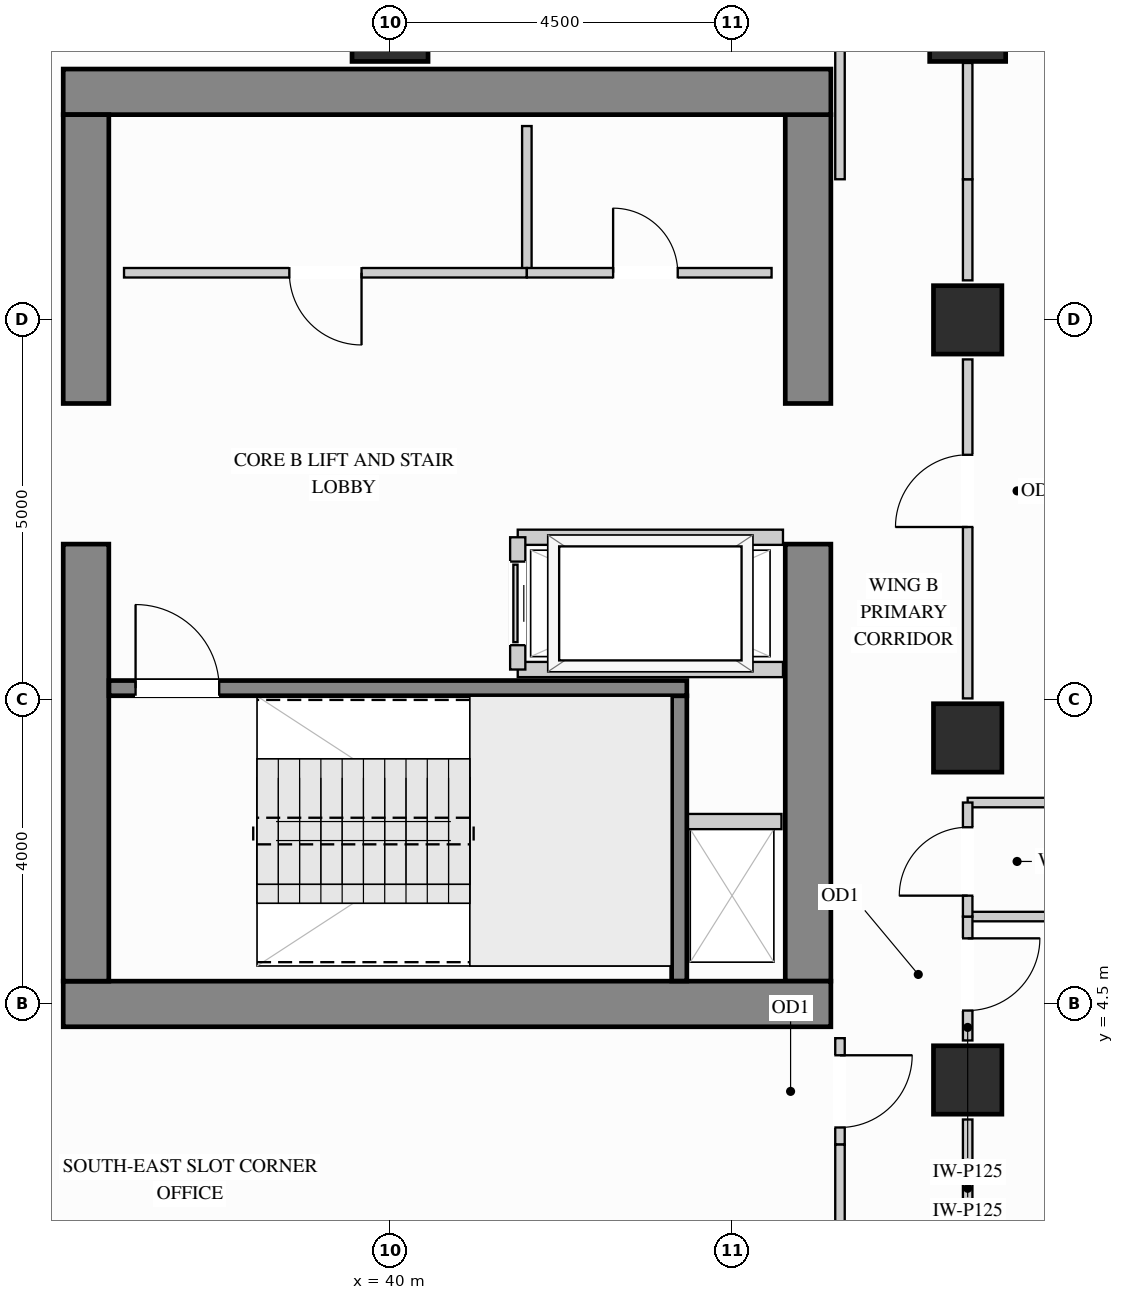
"""IFC4 building model, lengths in metres.
Left out: names, types, materials, properties, quantities, classifications, styles, units other than length and angle.
Written with IfcOpenShell. Run it as: python <this file> out.ifc"""

import sys

from ifc_helpers import new_model, si_unit, direction, frame, frame_2d, origin, origin_2d, place, context, subcontext, project, spatial, rectangle, extrude, source, transform, mapped, element, fill, save


model = new_model("IFC4")
c1 = context("Model", 3, precision=1e-05, world=origin(), true_north=direction((0.0, 1.0)))
c2 = subcontext(c1, "Body", "Model", "MODEL_VIEW")
j1 = project(units=[si_unit("LENGTHUNIT", "METRE"), si_unit("PLANEANGLEUNIT", "RADIAN")], contexts=[c1])
p1 = place(None, origin())
s1 = spatial("IfcSite", under=j1, at=p1, CompositionType="ELEMENT")
p2 = place(p1, origin())
s2 = spatial("IfcBuilding", under=s1, at=p2, CompositionType="ELEMENT")
p3 = place(p2, frame((0.0, 0.0, 175.5)))
s3 = spatial("IfcBuildingStorey", under=s2, at=p3, CompositionType="ELEMENT", Elevation=175.5)
m1 = source(origin(), c2, "Body", "SweptSolid", [
    extrude(rectangle(XDim=0.9, YDim=0.9, at=origin_2d()), origin(), (0.0, 0.0, 1.0), 3.4),
])
for number, where, z_axis, x_axis in (
    (1, (47.6, 13.5, 0.0), (0.0, 0.0, 1.0), (1.0, 0.0, 0.0)),
    (2, (47.6, 3.5, 0.0), (0.0, 0.0, 1.0), (1.0, 0.0, 0.0)),
    (3, (47.6, 8.0, 0.0), (0.0, 0.0, 1.0), (1.0, 0.0, 0.0)),
):
    element("IfcColumn", number, at=place(p3, frame(where, z_axis=z_axis, x_axis=x_axis)), inside=s3, PredefinedType="COLUMN", context=c2, shape_type="MappedRepresentation", body=[
        mapped(m1, transform((0.0, 0.0, 0.0), x_axis=(1.0, 0.0, 0.0), y_axis=(0.0, 1.0, 0.0), z_axis=(0.0, 0.0, 1.0))),
    ])
m2 = source(origin(), c2, "Body", "SweptSolid", [
    extrude(rectangle(XDim=1.0, YDim=1.0, at=origin_2d()), origin(), (0.0, 0.0, 1.0), 3.4),
])
for number, where, z_axis, x_axis in (
    (4, (40.0, 17.4, 0.0), (0.0, 0.0, 1.0), (1.0, 0.0, 0.0)),
    (5, (47.6, 17.4, 0.0), (0.0, 0.0, 1.0), (1.0, 0.0, 0.0)),
):
    element("IfcColumn", number, at=place(p3, frame(where, z_axis=z_axis, x_axis=x_axis)), inside=s3, PredefinedType="COLUMN", context=c2, shape_type="MappedRepresentation", body=[
        mapped(m2, transform((0.0, 0.0, 0.0), x_axis=(1.0, 0.0, 0.0), y_axis=(0.0, 1.0, 0.0), z_axis=(0.0, 0.0, 1.0))),
    ])
m3 = source(origin(), c2, "Body", "SweptSolid", [
    extrude(rectangle(XDim=5.75, YDim=0.6, at=frame_2d((2.875, 0.0))), origin(), (0.0, 0.0, 1.0), 3.4),
])
p4 = place(p3, frame((45.5, 4.8, 0.0), z_axis=(0.0, 0.0, 1.0), x_axis=(0.0, 1.0, 0.0)))
e6 = element("IfcWall", 6, at=p4, inside=s3, PredefinedType="SHEAR", context=c2, shape_type="MappedRepresentation", body=[
    mapped(m3, transform((0.0, 0.0, 0.0), x_axis=(1.0, 0.0, 0.0), y_axis=(0.0, 1.0, 0.0), z_axis=(0.0, 0.0, 1.0))),
])
m4 = source(origin(), c2, "Body", "SweptSolid", [
    extrude(rectangle(XDim=3.8, YDim=0.6, at=frame_2d((1.9, 0.0))), origin(), (0.0, 0.0, 1.0), 3.4),
])
p5 = place(p3, frame((45.5, 12.4, 0.0), z_axis=(0.0, 0.0, 1.0), x_axis=(0.0, 1.0, 0.0)))
e7 = element("IfcWall", 7, at=p5, inside=s3, PredefinedType="SHEAR", context=c2, shape_type="MappedRepresentation", body=[
    mapped(m4, transform((0.0, 0.0, 0.0), x_axis=(1.0, 0.0, 0.0), y_axis=(0.0, 1.0, 0.0), z_axis=(0.0, 0.0, 1.0))),
])
m5 = source(origin(), c2, "Body", "SweptSolid", [
    extrude(rectangle(XDim=10.1, YDim=0.6, at=frame_2d((5.05, 0.0))), origin(), (0.0, 0.0, 1.0), 3.4),
])
for number, where, z_axis, x_axis in (
    (8, (35.7, 16.5, 0.0), (0.0, 0.0, 1.0), (1.0, 0.0, 0.0)),
    (9, (35.7, 4.5, 0.0), (0.0, 0.0, 1.0), (1.0, 0.0, 0.0)),
):
    element("IfcWall", number, at=place(p3, frame(where, z_axis=z_axis, x_axis=x_axis)), inside=s3, PredefinedType="SHEAR", context=c2, shape_type="MappedRepresentation", body=[
        mapped(m5, transform((0.0, 0.0, 0.0), x_axis=(1.0, 0.0, 0.0), y_axis=(0.0, 1.0, 0.0), z_axis=(0.0, 0.0, 1.0))),
    ])
p6 = place(p3, frame((36.0, 4.8, 0.0), z_axis=(0.0, 0.0, 1.0), x_axis=(0.0, 1.0, 0.0)))
e10 = element("IfcWall", 10, at=p6, inside=s3, PredefinedType="SHEAR", context=c2, shape_type="MappedRepresentation", body=[
    mapped(m3, transform((0.0, 0.0, 0.0), x_axis=(1.0, 0.0, 0.0), y_axis=(0.0, 1.0, 0.0), z_axis=(0.0, 0.0, 1.0))),
])
p7 = place(p3, frame((36.0, 12.4, 0.0), z_axis=(0.0, 0.0, 1.0), x_axis=(0.0, 1.0, 0.0)))
e11 = element("IfcWall", 11, at=p7, inside=s3, PredefinedType="SHEAR", context=c2, shape_type="MappedRepresentation", body=[
    mapped(m4, transform((0.0, 0.0, 0.0), x_axis=(1.0, 0.0, 0.0), y_axis=(0.0, 1.0, 0.0), z_axis=(0.0, 0.0, 1.0))),
])
m6 = source(origin(), c2, "Body", "SweptSolid", [
    extrude(rectangle(XDim=1.93, YDim=0.125, at=frame_2d((0.965, 0.0))), origin(), (0.0, 0.0, 1.0), 3.385),
])
p8 = place(p3, frame((41.8, 14.12, 0.0), z_axis=(0.0, 0.0, 1.0), x_axis=(0.0, 1.0, 0.0)))
e12 = element("IfcWall", 12, at=p8, inside=s3, PredefinedType="PARTITIONING", context=c2, shape_type="MappedRepresentation", body=[
    mapped(m6, transform((0.0, 0.0, 0.0), x_axis=(1.0, 0.0, 0.0), y_axis=(0.0, 1.0, 0.0), z_axis=(0.0, 0.0, 1.0))),
])
p9 = place(p3, frame((36.5, 14.12, 0.0), z_axis=(0.0, 0.0, 1.0), x_axis=(1.0, 0.0, 0.0)))
e13 = element("IfcWall", 13, at=p9, inside=s3, PredefinedType="PARTITIONING", context=c2, shape_type="SweptSolid", body=[
    extrude(rectangle(XDim=5.3, YDim=0.125, at=frame_2d((2.65, 0.0))), origin(), (0.0, 0.0, 1.0), 3.385),
])
p10 = place(p9, frame((2.175, 0.0, 0.0)))
e14 = element("IfcOpeningElement", 14, at=p10, cuts=e13, PredefinedType="OPENING", context=c2, shape_type="SweptSolid", body=[
    extrude(rectangle(XDim=0.95, YDim=2.15, at=frame_2d((0.475, 1.075))), frame((0.0, 0.073, 0.0), z_axis=(0.0, -1.0, 0.0), x_axis=(1.0, 0.0, 0.0)), (0.0, 0.0, 1.0), 0.145),
])
p11 = place(p3, frame((41.8, 14.12, 0.0), z_axis=(0.0, 0.0, 1.0), x_axis=(1.0, 0.0, 0.0)))
e15 = element("IfcWall", 15, at=p11, inside=s3, PredefinedType="PARTITIONING", context=c2, shape_type="SweptSolid", body=[
    extrude(rectangle(XDim=3.22, YDim=0.125, at=frame_2d((1.61, 0.0))), origin(), (0.0, 0.0, 1.0), 3.385),
])
p12 = place(p11, frame((1.135, 0.0, 0.0)))
e16 = element("IfcOpeningElement", 16, at=p12, cuts=e15, PredefinedType="OPENING", context=c2, shape_type="SweptSolid", body=[
    extrude(rectangle(XDim=0.85, YDim=2.1, at=frame_2d((0.425, 1.05))), frame((0.0, 0.073, 0.0), z_axis=(0.0, -1.0, 0.0), x_axis=(1.0, 0.0, 0.0)), (0.0, 0.0, 1.0), 0.145),
])
m7 = source(origin(), c2, "Body", "SweptSolid", [
    extrude(rectangle(XDim=5.048, YDim=0.125, at=frame_2d((2.524, 0.0))), origin(), (0.0, 0.0, 1.0), 3.385),
])
for number, where, z_axis, x_axis in (
    (17, (47.6, 5.65, 0.0), (0.0, 0.0, 1.0), (1.0, 0.0, 0.0)),
    (18, (47.6, 7.15, 0.0), (0.0, 0.0, 1.0), (1.0, 0.0, 0.0)),
):
    element("IfcWall", number, at=place(p3, frame(where, z_axis=z_axis, x_axis=x_axis)), inside=s3, PredefinedType="PARTITIONING", context=c2, shape_type="MappedRepresentation", body=[
        mapped(m7, transform((0.0, 0.0, 0.0), x_axis=(1.0, 0.0, 0.0), y_axis=(0.0, 1.0, 0.0), z_axis=(0.0, 0.0, 1.0))),
    ])
p13 = place(p3, frame((47.6, 4.02, 0.0), z_axis=(0.0, 0.0, 1.0), x_axis=(0.0, 1.0, 0.0)))
e19 = element("IfcWall", 19, at=p13, inside=s3, PredefinedType="PARTITIONING", context=c2, shape_type="SweptSolid", body=[
    extrude(rectangle(XDim=1.63, YDim=0.125, at=frame_2d((0.815, 0.0))), origin(), (0.0, 0.0, 1.0), 2.773),
])
p14 = place(p13, frame((0.393, 0.0, 0.0)))
e20 = element("IfcOpeningElement", 20, at=p14, cuts=e19, PredefinedType="OPENING", context=c2, shape_type="SweptSolid", body=[
    extrude(rectangle(XDim=0.95, YDim=2.15, at=frame_2d((0.475, 1.075))), frame((0.0, 0.073, 0.0), z_axis=(0.0, -1.0, 0.0), x_axis=(1.0, 0.0, 0.0)), (0.0, 0.0, 1.0), 0.145),
])
m8 = source(origin(), c2, "Body", "SweptSolid", [
    extrude(rectangle(XDim=1.86, YDim=0.125, at=frame_2d((0.93, 0.0))), origin(), (0.0, 0.0, 1.0), 2.773),
])
p15 = place(p3, frame((47.6, 1.12, 0.0), z_axis=(0.0, 0.0, 1.0), x_axis=(0.0, 1.0, 0.0)))
e21 = element("IfcWall", 21, at=p15, inside=s3, PredefinedType="PARTITIONING", context=c2, shape_type="MappedRepresentation", body=[
    mapped(m8, transform((0.0, 0.0, 0.0), x_axis=(1.0, 0.0, 0.0), y_axis=(0.0, 1.0, 0.0), z_axis=(0.0, 0.0, 1.0))),
])
p16 = place(p3, frame((47.6, 8.52, 0.0), z_axis=(0.0, 0.0, 1.0), x_axis=(0.0, 1.0, 0.0)))
e22 = element("IfcWall", 22, at=p16, inside=s3, PredefinedType="PARTITIONING", context=c2, shape_type="SweptSolid", body=[
    extrude(rectangle(XDim=4.46, YDim=0.125, at=frame_2d((2.23, 0.0))), origin(), (0.0, 0.0, 1.0), 2.773),
])
p17 = place(p16, frame((2.255, 0.0, 0.0)))
e23 = element("IfcOpeningElement", 23, at=p17, cuts=e22, PredefinedType="OPENING", context=c2, shape_type="SweptSolid", body=[
    extrude(rectangle(XDim=0.95, YDim=2.15, at=frame_2d((0.475, 1.075))), frame((0.0, 0.073, 0.0), z_axis=(0.0, -1.0, 0.0), x_axis=(1.0, 0.0, 0.0)), (0.0, 0.0, 1.0), 0.145),
])
m9 = source(origin(), c2, "Body", "SweptSolid", [
    extrude(rectangle(XDim=1.33, YDim=0.125, at=frame_2d((0.665, 0.0))), origin(), (0.0, 0.0, 1.0), 2.773),
])
p18 = place(p3, frame((47.6, 14.02, 0.0), z_axis=(0.0, 0.0, 1.0), x_axis=(0.0, 1.0, 0.0)))
e24 = element("IfcWall", 24, at=p18, inside=s3, PredefinedType="PARTITIONING", context=c2, shape_type="MappedRepresentation", body=[
    mapped(m9, transform((0.0, 0.0, 0.0), x_axis=(1.0, 0.0, 0.0), y_axis=(0.0, 1.0, 0.0), z_axis=(0.0, 0.0, 1.0))),
])
m10 = source(origin(), c2, "Body", "SweptSolid", [
    extrude(rectangle(XDim=1.53, YDim=0.125, at=frame_2d((0.765, 0.0))), origin(), (0.0, 0.0, 1.0), 2.773),
])
p19 = place(p3, frame((47.6, 15.35, 0.0), z_axis=(0.0, 0.0, 1.0), x_axis=(0.0, 1.0, 0.0)))
e25 = element("IfcWall", 25, at=p19, inside=s3, PredefinedType="PARTITIONING", context=c2, shape_type="MappedRepresentation", body=[
    mapped(m10, transform((0.0, 0.0, 0.0), x_axis=(1.0, 0.0, 0.0), y_axis=(0.0, 1.0, 0.0), z_axis=(0.0, 0.0, 1.0))),
])
p20 = place(p3, frame((47.6, 5.65, 0.0), z_axis=(0.0, 0.0, 1.0), x_axis=(0.0, 1.0, 0.0)))
e26 = element("IfcWall", 26, at=p20, inside=s3, PredefinedType="PARTITIONING", context=c2, shape_type="SweptSolid", body=[
    extrude(rectangle(XDim=1.5, YDim=0.125, at=frame_2d((0.75, 0.0))), origin(), (0.0, 0.0, 1.0), 2.773),
])
p21 = place(p20, frame((0.275, 0.0, 0.0)))
e27 = element("IfcOpeningElement", 27, at=p21, cuts=e26, PredefinedType="OPENING", context=c2, shape_type="SweptSolid", body=[
    extrude(rectangle(XDim=0.9, YDim=2.15, at=frame_2d((0.45, 1.075))), frame((0.0, 0.073, 0.0), z_axis=(0.0, -1.0, 0.0), x_axis=(1.0, 0.0, 0.0)), (0.0, 0.0, 1.0), 0.145),
])
m11 = source(origin(), c2, "Body", "SweptSolid", [
    extrude(rectangle(XDim=2.298, YDim=0.125, at=frame_2d((1.149, 0.0))), origin(), (0.0, 0.0, 1.0), 3.385),
])
p22 = place(p3, frame((45.92, 15.35, 0.0), z_axis=(0.0, 0.0, 1.0), x_axis=(0.0, 1.0, 0.0)))
e28 = element("IfcWall", 28, at=p22, inside=s3, PredefinedType="PARTITIONING", context=c2, shape_type="MappedRepresentation", body=[
    mapped(m11, transform((0.0, 0.0, 0.0), x_axis=(1.0, 0.0, 0.0), y_axis=(0.0, 1.0, 0.0), z_axis=(0.0, 0.0, 1.0))),
])
p23 = place(p3, frame((45.92, 2.65, 0.0), z_axis=(0.0, 0.0, 1.0), x_axis=(0.0, 1.0, 0.0)))
e29 = element("IfcWall", 29, at=p23, inside=s3, PredefinedType="PARTITIONING", context=c2, shape_type="SweptSolid", body=[
    extrude(rectangle(XDim=1.4, YDim=0.125, at=frame_2d((0.7, 0.0))), origin(), (0.0, 0.0, 1.0), 3.385),
])
p24 = place(p23, frame((0.225, 0.0, 0.0)))
e30 = element("IfcOpeningElement", 30, at=p24, cuts=e29, PredefinedType="OPENING", context=c2, shape_type="SweptSolid", body=[
    extrude(rectangle(XDim=0.95, YDim=2.15, at=frame_2d((0.475, 1.075))), frame((0.0, 0.073, 0.0), z_axis=(0.0, -1.0, 0.0), x_axis=(1.0, 0.0, 0.0)), (0.0, 0.0, 1.0), 0.145),
])
p25 = place(p3, frame((45.92, 0.352, 0.0), z_axis=(0.0, 0.0, 1.0), x_axis=(0.0, 1.0, 0.0)))
e31 = element("IfcWall", 31, at=p25, inside=s3, PredefinedType="PARTITIONING", context=c2, shape_type="MappedRepresentation", body=[
    mapped(m11, transform((0.0, 0.0, 0.0), x_axis=(1.0, 0.0, 0.0), y_axis=(0.0, 1.0, 0.0), z_axis=(0.0, 0.0, 1.0))),
])
m12 = source(origin(), c2, "Body", "SweptSolid", [
    extrude(rectangle(XDim=1.3, YDim=0.2, at=frame_2d((0.65, 0.0))), origin(), (0.0, 0.0, 1.0), 3.385),
])
p26 = place(p3, frame((43.85, 6.9, 0.0), z_axis=(0.0, 0.0, 1.0), x_axis=(1.0, 0.0, 0.0)))
e32 = element("IfcWall", 32, at=p26, inside=s3, PredefinedType="PARTITIONING", context=c2, shape_type="MappedRepresentation", body=[
    mapped(m12, transform((0.0, 0.0, 0.0), x_axis=(1.0, 0.0, 0.0), y_axis=(0.0, 1.0, 0.0), z_axis=(0.0, 0.0, 1.0))),
])
m13 = source(origin(), c2, "Body", "SweptSolid", [
    extrude(rectangle(XDim=3.49, YDim=0.2, at=frame_2d((1.745, 0.0))), origin(), (0.0, 0.0, 1.0), 3.385),
])
for number, where, z_axis, x_axis in (
    (33, (41.68, 10.64, 0.0), (0.0, 0.0, 1.0), (1.0, 0.0, 0.0)),
    (34, (41.68, 8.9, 0.0), (0.0, 0.0, 1.0), (1.0, 0.0, 0.0)),
):
    element("IfcWall", number, at=place(p3, frame(where, z_axis=z_axis, x_axis=x_axis)), inside=s3, PredefinedType="PARTITIONING", context=c2, shape_type="MappedRepresentation", body=[
        mapped(m13, transform((0.0, 0.0, 0.0), x_axis=(1.0, 0.0, 0.0), y_axis=(0.0, 1.0, 0.0), z_axis=(0.0, 0.0, 1.0))),
    ])
p27 = place(p3, frame((41.68, 8.9, 0.0), z_axis=(0.0, 0.0, 1.0), x_axis=(0.0, 1.0, 0.0)))
e35 = element("IfcWall", 35, at=p27, inside=s3, PredefinedType="PARTITIONING", context=c2, shape_type="SweptSolid", body=[
    extrude(rectangle(XDim=1.74, YDim=0.2, at=frame_2d((0.87, 0.0))), origin(), (0.0, 0.0, 1.0), 3.385),
])
p28 = place(p27, frame((0.32, 0.0, 0.0)))
e36 = element("IfcOpeningElement", 36, at=p28, cuts=e35, PredefinedType="OPENING", context=c2, shape_type="SweptSolid", body=[
    extrude(rectangle(XDim=1.1, YDim=2.2, at=frame_2d((0.55, 1.1))), frame((0.0, 0.11, 0.0), z_axis=(0.0, -1.0, 0.0), x_axis=(1.0, 0.0, 0.0)), (0.0, 0.0, 1.0), 0.22),
])
m14 = source(origin(), c2, "Body", "SweptSolid", [
    extrude(rectangle(XDim=3.753, YDim=0.2, at=frame_2d((1.876, 0.0))), origin(), (0.0, 0.0, 1.0), 3.4),
])
p29 = place(p3, frame((43.805, 4.802, 0.0), z_axis=(0.0, 0.0, 1.0), x_axis=(0.0, 1.0, 0.0)))
e37 = element("IfcWall", 37, at=p29, inside=s3, PredefinedType="SHEAR", context=c2, shape_type="MappedRepresentation", body=[
    mapped(m14, transform((0.0, 0.0, 0.0), x_axis=(1.0, 0.0, 0.0), y_axis=(0.0, 1.0, 0.0), z_axis=(0.0, 0.0, 1.0))),
])
p30 = place(p3, frame((36.302, 8.655, 0.0), z_axis=(0.0, 0.0, 1.0), x_axis=(1.0, 0.0, 0.0)))
e38 = element("IfcWall", 38, at=p30, inside=s3, PredefinedType="SHEAR", context=c2, shape_type="SweptSolid", body=[
    extrude(rectangle(XDim=7.603, YDim=0.2, at=frame_2d((3.802, 0.0))), origin(), (0.0, 0.0, 1.0), 3.4),
])
p31 = place(p30, frame((0.35, 0.0, 0.0)))
e39 = element("IfcOpeningElement", 39, at=p31, cuts=e38, PredefinedType="OPENING", context=c2, shape_type="SweptSolid", body=[
    extrude(rectangle(XDim=1.1, YDim=2.15, at=frame_2d((0.55, 1.075))), frame((0.0, 0.11, 0.0), z_axis=(0.0, -1.0, 0.0), x_axis=(1.0, 0.0, 0.0)), (0.0, 0.0, 1.0), 0.22),
])
m15 = source(origin(), c2, "Body", "SweptSolid", [
    extrude(rectangle(XDim=1.1, YDim=2.2, at=frame_2d((0.55, 1.1))), frame((0.0, 0.025, 0.0), z_axis=(0.0, -1.0, 0.0), x_axis=(1.0, 0.0, 0.0)), (0.0, 0.0, 1.0), 0.05),
])
p32 = place(p28, origin())
e40 = element("IfcDoor", 40, at=p32, inside=s3, OperationType="SLIDING_TO_LEFT", PredefinedType="DOOR", context=c2, shape_type="MappedRepresentation", body=[
    mapped(m15, transform((0.0, 0.0, 0.0), x_axis=(1.0, 0.0, 0.0), y_axis=(0.0, 1.0, 0.0), z_axis=(0.0, 0.0, 1.0))),
])
fill(e36, e40)
m16 = source(origin(), c2, "Body", "SweptSolid", [
    extrude(rectangle(XDim=0.95, YDim=2.15, at=frame_2d((0.475, 1.075))), frame((0.0, 0.025, 0.0), z_axis=(0.0, -1.0, 0.0), x_axis=(1.0, 0.0, 0.0)), (0.0, 0.0, 1.0), 0.05),
])
p33 = place(p10, origin())
e41 = element("IfcDoor", 41, at=p33, inside=s3, OperationType="SINGLE_SWING_RIGHT", PredefinedType="DOOR", context=c2, shape_type="MappedRepresentation", body=[
    mapped(m16, transform((0.0, 0.0, 0.0), x_axis=(1.0, 0.0, 0.0), y_axis=(0.0, 1.0, 0.0), z_axis=(0.0, 0.0, 1.0))),
])
fill(e14, e41)
p34 = place(p24, origin())
e42 = element("IfcDoor", 42, at=p34, inside=s3, OperationType="SINGLE_SWING_RIGHT", PredefinedType="DOOR", context=c2, shape_type="MappedRepresentation", body=[
    mapped(m16, transform((0.0, 0.0, 0.0), x_axis=(1.0, 0.0, 0.0), y_axis=(0.0, 1.0, 0.0), z_axis=(0.0, 0.0, 1.0))),
])
fill(e30, e42)
p35 = place(p14, origin())
e43 = element("IfcDoor", 43, at=p35, inside=s3, OperationType="SINGLE_SWING_RIGHT", PredefinedType="DOOR", context=c2, shape_type="MappedRepresentation", body=[
    mapped(m16, transform((0.0, 0.0, 0.0), x_axis=(1.0, 0.0, 0.0), y_axis=(0.0, 1.0, 0.0), z_axis=(0.0, 0.0, 1.0))),
])
fill(e20, e43)
p36 = place(p17, origin())
e44 = element("IfcDoor", 44, at=p36, inside=s3, OperationType="SINGLE_SWING_LEFT", PredefinedType="DOOR", context=c2, shape_type="MappedRepresentation", body=[
    mapped(m16, transform((0.0, 0.0, 0.0), x_axis=(1.0, 0.0, 0.0), y_axis=(0.0, 1.0, 0.0), z_axis=(0.0, 0.0, 1.0))),
])
fill(e23, e44)
m17 = source(origin(), c2, "Body", "SweptSolid", [
    extrude(rectangle(XDim=0.85, YDim=2.1, at=frame_2d((0.425, 1.05))), frame((0.0, 0.025, 0.0), z_axis=(0.0, -1.0, 0.0), x_axis=(1.0, 0.0, 0.0)), (0.0, 0.0, 1.0), 0.05),
])
p37 = place(p12, origin())
e45 = element("IfcDoor", 45, at=p37, inside=s3, OperationType="SINGLE_SWING_LEFT", PredefinedType="DOOR", context=c2, shape_type="MappedRepresentation", body=[
    mapped(m17, transform((0.0, 0.0, 0.0), x_axis=(1.0, 0.0, 0.0), y_axis=(0.0, 1.0, 0.0), z_axis=(0.0, 0.0, 1.0))),
])
fill(e16, e45)
m18 = source(origin(), c2, "Body", "SweptSolid", [
    extrude(rectangle(XDim=1.1, YDim=2.15, at=frame_2d((0.55, 1.075))), frame((0.0, 0.025, 0.0), z_axis=(0.0, -1.0, 0.0), x_axis=(1.0, 0.0, 0.0)), (0.0, 0.0, 1.0), 0.05),
])
p38 = place(p31, origin())
e46 = element("IfcDoor", 46, at=p38, inside=s3, OperationType="SINGLE_SWING_LEFT", PredefinedType="DOOR", context=c2, shape_type="MappedRepresentation", body=[
    mapped(m18, transform((0.0, 0.0, 0.0), x_axis=(1.0, 0.0, 0.0), y_axis=(0.0, 1.0, 0.0), z_axis=(0.0, 0.0, 1.0))),
])
fill(e39, e46)
m19 = source(origin(), c2, "Body", "SweptSolid", [
    extrude(rectangle(XDim=0.9, YDim=2.15, at=frame_2d((0.45, 1.075))), frame((0.0, 0.025, 0.0), z_axis=(0.0, -1.0, 0.0), x_axis=(1.0, 0.0, 0.0)), (0.0, 0.0, 1.0), 0.05),
])
p39 = place(p21, origin())
e47 = element("IfcDoor", 47, at=p39, inside=s3, OperationType="SINGLE_SWING_LEFT", PredefinedType="DOOR", context=c2, shape_type="MappedRepresentation", body=[
    mapped(m19, transform((0.0, 0.0, 0.0), x_axis=(1.0, 0.0, 0.0), y_axis=(0.0, 1.0, 0.0), z_axis=(0.0, 0.0, 1.0))),
])
fill(e27, e47)
save(model, sys.argv[1])
